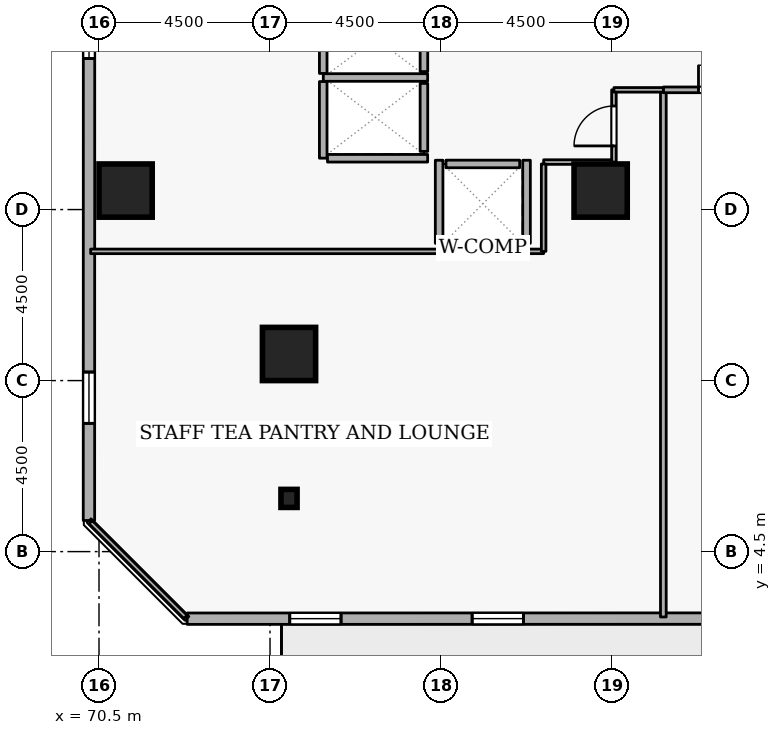
"""IFC4 building model, lengths in metres.
Left out: names, types, materials, properties, quantities, classifications, styles, units other than length and angle.
Written with IfcOpenShell. Run it as: python <this file> out.ifc"""

import sys

from ifc_helpers import new_model, si_unit, direction, frame, frame_2d, origin, origin_2d, place, context, subcontext, project, spatial, rectangle, i_section, extrude, element, fill, save


model = new_model("IFC4")
c1 = context("Model", 3, precision=1e-05, world=origin(), true_north=direction((0.0, 1.0)))
c2 = subcontext(c1, "Body", "Model", "MODEL_VIEW")
j1 = project(units=[si_unit("LENGTHUNIT", "METRE"), si_unit("PLANEANGLEUNIT", "RADIAN")], contexts=[c1])
p1 = place(None, origin())
s1 = spatial("IfcSite", under=j1, at=p1, CompositionType="ELEMENT")
p2 = place(p1, origin())
s2 = spatial("IfcBuilding", under=s1, at=p2, CompositionType="ELEMENT")
p3 = place(p2, frame((0.0, 0.0, 45.9)))
s3 = spatial("IfcBuildingStorey", under=s2, at=p3, CompositionType="ELEMENT", Elevation=45.9)
for number, where, z_axis, x_axis in (
    (1, (71.2, 14.0, 0.0), (0.0, 0.0, 1.0), (1.0, 0.0, 0.0)),
    (2, (75.5, 9.7, 0.0), (0.0, 0.0, 1.0), (1.0, 0.0, 0.0)),
    (3, (83.7, 14.0, 0.0), (0.0, 0.0, 1.0), (1.0, 0.0, 0.0)),
):
    element("IfcColumn", number, at=place(p3, frame(where, z_axis=z_axis, x_axis=x_axis)), inside=s3, PredefinedType="COLUMN", context=c2, shape_type="SweptSolid", body=[
        extrude(rectangle(XDim=1.4, YDim=1.4, at=origin_2d()), origin(), (0.0, 0.0, 1.0), 3.6),
    ])
p4 = place(p3, frame((75.5, 5.9, 0.0), z_axis=(0.0, 0.0, 1.0), x_axis=(1.0, 0.0, 0.0)))
e4 = element("IfcColumn", 4, at=p4, inside=s3, PredefinedType="COLUMN", context=c2, shape_type="SweptSolid", body=[
    extrude(i_section(OverallWidth=0.424, OverallDepth=0.475, WebThickness=0.048, FlangeThickness=0.077, FilletRadius=0.015, at=origin_2d()), origin(), (0.0, 0.0, 1.0), 3.6),
])
p5 = place(p3, frame((72.819, 2.735, 0.0), z_axis=(0.0, 0.0, 1.0), x_axis=(0.999999983929, 0.00017928314, 0.0)))
e5 = element("IfcWall", 5, at=p5, inside=s3, PredefinedType="STANDARD", context=c2, shape_type="SweptSolid", body=[
    extrude(rectangle(XDim=35.406, YDim=0.3, at=frame_2d((17.703, 0.0))), origin(), (0.0, 0.0, 1.0), 2.22),
])
p6 = place(p5, frame((19.503, 0.0, 0.0)))
e6 = element("IfcOpeningElement", 6, at=p6, cuts=e5, PredefinedType="OPENING", context=c2, shape_type="SweptSolid", body=[
    extrude(rectangle(XDim=1.0, YDim=2.08, at=frame_2d((0.5, 1.04))), frame((0.0, 0.16, 0.0), z_axis=(0.0, -1.0, 0.0), x_axis=(1.0, 0.0, 0.0)), (0.0, 0.0, 1.0), 0.32),
])
p7 = place(p5, frame((2.7, 0.0, 0.72)))
e7 = element("IfcOpeningElement", 7, at=p7, cuts=e5, PredefinedType="OPENING", context=c2, shape_type="SweptSolid", body=[
    extrude(rectangle(XDim=1.35, YDim=1.05, at=frame_2d((0.675, 0.525))), frame((0.0, 0.16, 0.0), z_axis=(0.0, -1.0, 0.0), x_axis=(1.0, 0.0, 0.0)), (0.0, 0.0, 1.0), 0.32),
])
p8 = place(p5, frame((7.5, 0.0, 0.72)))
e8 = element("IfcOpeningElement", 8, at=p8, cuts=e5, PredefinedType="OPENING", context=c2, shape_type="SweptSolid", body=[
    extrude(rectangle(XDim=1.35, YDim=1.05, at=frame_2d((0.675, 0.525))), frame((0.0, 0.16, 0.0), z_axis=(0.0, -1.0, 0.0), x_axis=(1.0, 0.0, 0.0)), (0.0, 0.0, 1.0), 0.32),
])
p9 = place(p5, frame((17.1, 0.0, 0.72)))
e9 = element("IfcOpeningElement", 9, at=p9, cuts=e5, PredefinedType="OPENING", context=c2, shape_type="SweptSolid", body=[
    extrude(rectangle(XDim=1.35, YDim=1.05, at=frame_2d((0.675, 0.525))), frame((0.0, 0.16, 0.0), z_axis=(0.0, -1.0, 0.0), x_axis=(1.0, 0.0, 0.0)), (0.0, 0.0, 1.0), 0.32),
])
p10 = place(p5, frame((21.9, 0.0, 0.72)))
e10 = element("IfcOpeningElement", 10, at=p10, cuts=e5, PredefinedType="OPENING", context=c2, shape_type="SweptSolid", body=[
    extrude(rectangle(XDim=1.35, YDim=1.05, at=frame_2d((0.675, 0.525))), frame((0.0, 0.16, 0.0), z_axis=(0.0, -1.0, 0.0), x_axis=(1.0, 0.0, 0.0)), (0.0, 0.0, 1.0), 0.32),
])
p11 = place(p5, frame((26.7, 0.0, 0.72)))
e11 = element("IfcOpeningElement", 11, at=p11, cuts=e5, PredefinedType="OPENING", context=c2, shape_type="SweptSolid", body=[
    extrude(rectangle(XDim=1.35, YDim=1.05, at=frame_2d((0.675, 0.525))), frame((0.0, 0.16, 0.0), z_axis=(0.0, -1.0, 0.0), x_axis=(1.0, 0.0, 0.0)), (0.0, 0.0, 1.0), 0.32),
])
p12 = place(p3, frame((70.241, 40.725, 0.0), z_axis=(0.0, 0.0, 1.0), x_axis=(-0.00017928314, -0.999999983929, 0.0)))
e12 = element("IfcWall", 12, at=p12, inside=s3, PredefinedType="STANDARD", context=c2, shape_type="SweptSolid", body=[
    extrude(rectangle(XDim=35.406, YDim=0.3, at=frame_2d((17.703, 0.0))), origin(), (0.0, 0.0, 1.0), 2.22),
])
p13 = place(p12, frame((7.5, 0.0, 0.72)))
e13 = element("IfcOpeningElement", 13, at=p13, cuts=e12, PredefinedType="OPENING", context=c2, shape_type="SweptSolid", body=[
    extrude(rectangle(XDim=1.35, YDim=1.05, at=frame_2d((0.675, 0.525))), frame((0.0, 0.16, 0.0), z_axis=(0.0, -1.0, 0.0), x_axis=(1.0, 0.0, 0.0)), (0.0, 0.0, 1.0), 0.32),
])
p14 = place(p12, frame((17.1, 0.0, 0.72)))
e14 = element("IfcOpeningElement", 14, at=p14, cuts=e12, PredefinedType="OPENING", context=c2, shape_type="SweptSolid", body=[
    extrude(rectangle(XDim=1.35, YDim=1.05, at=frame_2d((0.675, 0.525))), frame((0.0, 0.16, 0.0), z_axis=(0.0, -1.0, 0.0), x_axis=(1.0, 0.0, 0.0)), (0.0, 0.0, 1.0), 0.32),
])
p15 = place(p12, frame((21.9, 0.0, 0.72)))
e15 = element("IfcOpeningElement", 15, at=p15, cuts=e12, PredefinedType="OPENING", context=c2, shape_type="SweptSolid", body=[
    extrude(rectangle(XDim=1.35, YDim=1.05, at=frame_2d((0.675, 0.525))), frame((0.0, 0.16, 0.0), z_axis=(0.0, -1.0, 0.0), x_axis=(1.0, 0.0, 0.0)), (0.0, 0.0, 1.0), 0.32),
])
p16 = place(p12, frame((31.5, 0.0, 0.72)))
e16 = element("IfcOpeningElement", 16, at=p16, cuts=e12, PredefinedType="OPENING", context=c2, shape_type="SweptSolid", body=[
    extrude(rectangle(XDim=1.35, YDim=1.05, at=frame_2d((0.675, 0.525))), frame((0.0, 0.16, 0.0), z_axis=(0.0, -1.0, 0.0), x_axis=(1.0, 0.0, 0.0)), (0.0, 0.0, 1.0), 0.32),
])
p17 = place(p3, frame((79.05, 17.13, 0.0), z_axis=(0.0, 0.0, 1.0), x_axis=(0.0, 1.0, 0.0)))
e17 = element("IfcWall", 17, at=p17, inside=s3, PredefinedType="STANDARD", context=c2, shape_type="SweptSolid", body=[
    extrude(rectangle(XDim=1.74, YDim=0.2, at=frame_2d((0.87, 0.0))), origin(), (0.0, 0.0, 1.0), 3.26),
])
p18 = place(p3, frame((79.05, 15.03, 0.0), z_axis=(0.0, 0.0, 1.0), x_axis=(0.0, 1.0, 0.0)))
e18 = element("IfcWall", 18, at=p18, inside=s3, PredefinedType="STANDARD", context=c2, shape_type="SweptSolid", body=[
    extrude(rectangle(XDim=1.79, YDim=0.2, at=frame_2d((0.895, 0.0))), origin(), (0.0, 0.0, 1.0), 3.26),
])
p19 = place(p3, frame((79.63, 14.7, 0.0), z_axis=(0.0, 0.0, 1.0), x_axis=(1.0, 0.0, 0.0)))
e19 = element("IfcWall", 19, at=p19, inside=s3, PredefinedType="STANDARD", context=c2, shape_type="SweptSolid", body=[
    extrude(rectangle(XDim=1.94, YDim=0.2, at=frame_2d((0.97, 0.0))), origin(), (0.0, 0.0, 1.0), 3.26),
])
p20 = place(p3, frame((76.402, 16.975, 0.0), z_axis=(0.0, 0.0, 1.0), x_axis=(1.0, 0.0, 0.0)))
e20 = element("IfcWall", 20, at=p20, inside=s3, PredefinedType="STANDARD", context=c2, shape_type="SweptSolid", body=[
    extrude(rectangle(XDim=2.746, YDim=0.2, at=frame_2d((1.373, 0.0))), origin(), (0.0, 0.0, 1.0), 3.26),
])
p21 = place(p3, frame((76.4, 14.852, 0.0), z_axis=(0.0, 0.0, 1.0), x_axis=(0.0, 1.0, 0.0)))
e21 = element("IfcWall", 21, at=p21, inside=s3, PredefinedType="STANDARD", context=c2, shape_type="SweptSolid", body=[
    extrude(rectangle(XDim=2.016, YDim=0.2, at=frame_2d((1.008, 0.0))), origin(), (0.0, 0.0, 1.0), 3.26),
])
p22 = place(p3, frame((76.4, 17.082, 0.0), z_axis=(0.0, 0.0, 1.0), x_axis=(0.0, 1.0, 0.0)))
e22 = element("IfcWall", 22, at=p22, inside=s3, PredefinedType="STANDARD", context=c2, shape_type="SweptSolid", body=[
    extrude(rectangle(XDim=1.856, YDim=0.2, at=frame_2d((0.928, 0.0))), origin(), (0.0, 0.0, 1.0), 3.26),
])
p23 = place(p3, frame((76.512, 14.85, 0.0), z_axis=(0.0, 0.0, 1.0), x_axis=(1.0, 0.0, 0.0)))
e23 = element("IfcWall", 23, at=p23, inside=s3, PredefinedType="STANDARD", context=c2, shape_type="SweptSolid", body=[
    extrude(rectangle(XDim=2.636, YDim=0.2, at=frame_2d((1.318, 0.0))), origin(), (0.0, 0.0, 1.0), 3.26),
])
p24 = place(p3, frame((79.452, 12.5, 0.0), z_axis=(0.0, 0.0, 1.0), x_axis=(1.0, 0.0, 0.0)))
e24 = element("IfcWall", 24, at=p24, inside=s3, PredefinedType="STANDARD", context=c2, shape_type="SweptSolid", body=[
    extrude(rectangle(XDim=2.296, YDim=0.2, at=frame_2d((1.148, 0.0))), origin(), (0.0, 0.0, 1.0), 3.26),
])
for number, where, z_axis, x_axis in (
    (25, (81.75, 12.612, 0.0), (0.0, 0.0, 1.0), (0.0, 1.0, 0.0)),
    (26, (79.45, 12.612, 0.0), (0.0, 0.0, 1.0), (0.0, 1.0, 0.0)),
):
    element("IfcWall", number, at=place(p3, frame(where, z_axis=z_axis, x_axis=x_axis)), inside=s3, PredefinedType="STANDARD", context=c2, shape_type="SweptSolid", body=[
        extrude(rectangle(XDim=2.186, YDim=0.2, at=frame_2d((1.093, 0.0))), origin(), (0.0, 0.0, 1.0), 3.26),
    ])
p25 = place(p3, frame((85.35, 2.78, 0.0), z_axis=(0.0, 0.0, 1.0), x_axis=(0.0, 1.0, 0.0)))
e27 = element("IfcWall", 27, at=p25, inside=s3, PredefinedType="PARTITIONING", context=c2, shape_type="SweptSolid", body=[
    extrude(rectangle(XDim=13.87, YDim=0.15, at=frame_2d((6.935, 0.0))), origin(), (0.0, 0.0, 1.0), 3.26),
])
p26 = place(p3, frame((85.35, 16.65, 0.0), z_axis=(0.0, 0.0, 1.0), x_axis=(1.0, 0.0, 0.0)))
e28 = element("IfcWall", 28, at=p26, inside=s3, PredefinedType="PARTITIONING", context=c2, shape_type="SweptSolid", body=[
    extrude(rectangle(XDim=3.15, YDim=0.15, at=frame_2d((1.575, 0.0))), origin(), (0.0, 0.0, 1.0), 3.26),
])
p27 = place(p26, frame((0.925, 0.0, 0.0)))
e29 = element("IfcOpeningElement", 29, at=p27, cuts=e28, PredefinedType="OPENING", context=c2, shape_type="SweptSolid", body=[
    extrude(rectangle(XDim=1.3, YDim=2.12, at=frame_2d((0.65, 1.06))), frame((0.0, 0.085, 0.0), z_axis=(0.0, -1.0, 0.0), x_axis=(1.0, 0.0, 0.0)), (0.0, 0.0, 1.0), 0.17),
])
p28 = place(p3, frame((82.2, 14.75, 0.0), z_axis=(0.0, 0.0, 1.0), x_axis=(1.0, 0.0, 0.0)))
e30 = element("IfcWall", 30, at=p28, inside=s3, PredefinedType="PARTITIONING", context=c2, shape_type="SweptSolid", body=[
    extrude(rectangle(XDim=1.85, YDim=0.12, at=frame_2d((0.925, 0.0))), origin(), (0.0, 0.0, 1.0), 3.26),
])
p29 = place(p3, frame((84.05, 14.75, 0.0), z_axis=(0.0, 0.0, 1.0), x_axis=(0.0, 1.0, 0.0)))
e31 = element("IfcWall", 31, at=p29, inside=s3, PredefinedType="PARTITIONING", context=c2, shape_type="SweptSolid", body=[
    extrude(rectangle(XDim=1.9, YDim=0.12, at=frame_2d((0.95, 0.0))), origin(), (0.0, 0.0, 1.0), 3.26),
])
p30 = place(p29, frame((0.425, 0.0, 0.0)))
e32 = element("IfcOpeningElement", 32, at=p30, cuts=e31, PredefinedType="OPENING", context=c2, shape_type="SweptSolid", body=[
    extrude(rectangle(XDim=1.05, YDim=2.1, at=frame_2d((0.525, 1.05))), frame((0.0, 0.07, 0.0), z_axis=(0.0, -1.0, 0.0), x_axis=(1.0, 0.0, 0.0)), (0.0, 0.0, 1.0), 0.14),
])
p31 = place(p3, frame((84.05, 16.65, 0.0), z_axis=(0.0, 0.0, 1.0), x_axis=(1.0, 0.0, 0.0)))
e33 = element("IfcWall", 33, at=p31, inside=s3, PredefinedType="PARTITIONING", context=c2, shape_type="SweptSolid", body=[
    extrude(rectangle(XDim=1.3, YDim=0.12, at=frame_2d((0.65, 0.0))), origin(), (0.0, 0.0, 1.0), 3.26),
])
p32 = place(p3, frame((72.775, 2.78, 0.0), z_axis=(0.0, 0.0, 1.0), x_axis=(-0.707106781187, 0.707106781187, 0.0)))
e34 = element("IfcWall", 34, at=p32, inside=s3, PredefinedType="PARTITIONING", context=c2, shape_type="SweptSolid", body=[
    extrude(rectangle(XDim=3.528, YDim=0.12, at=frame_2d((1.764, 0.0))), origin(), (0.0, 0.0, 1.0), 3.26),
])
p33 = place(p3, frame((70.28, 12.4, 0.0), z_axis=(0.0, 0.0, 1.0), x_axis=(1.0, 0.0, 0.0)))
e35 = element("IfcWall", 35, at=p33, inside=s3, PredefinedType="PARTITIONING", context=c2, shape_type="SweptSolid", body=[
    extrude(rectangle(XDim=9.172, YDim=0.12, at=frame_2d((4.586, 0.0))), origin(), (0.0, 0.0, 1.0), 3.26),
])
p34 = place(p3, frame((81.748, 12.4, 0.0), z_axis=(0.0, 0.0, 1.0), x_axis=(1.0, 0.0, 0.0)))
e36 = element("IfcWall", 36, at=p34, inside=s3, PredefinedType="PARTITIONING", context=c2, shape_type="SweptSolid", body=[
    extrude(rectangle(XDim=0.452, YDim=0.12, at=frame_2d((0.226, 0.0))), origin(), (0.0, 0.0, 1.0), 3.26),
])
p35 = place(p3, frame((82.2, 12.4, 0.0), z_axis=(0.0, 0.0, 1.0), x_axis=(0.0, 1.0, 0.0)))
e37 = element("IfcWall", 37, at=p35, inside=s3, PredefinedType="PARTITIONING", context=c2, shape_type="SweptSolid", body=[
    extrude(rectangle(XDim=2.3, YDim=0.12, at=frame_2d((1.15, 0.0))), origin(), (0.0, 0.0, 1.0), 3.26),
])
p36 = place(p7, origin())
e38 = element("IfcWindow", 38, at=p36, inside=s3, PartitioningType="SINGLE_PANEL", PredefinedType="WINDOW", context=c2, shape_type="SweptSolid", body=[
    extrude(rectangle(XDim=1.35, YDim=1.05, at=frame_2d((0.675, 0.525))), frame((0.0, 0.03, 0.0), z_axis=(0.0, -1.0, 0.0), x_axis=(1.0, 0.0, 0.0)), (0.0, 0.0, 1.0), 0.06),
])
fill(e7, e38)
p37 = place(p8, origin())
e39 = element("IfcWindow", 39, at=p37, inside=s3, PartitioningType="SINGLE_PANEL", PredefinedType="WINDOW", context=c2, shape_type="SweptSolid", body=[
    extrude(rectangle(XDim=1.35, YDim=1.05, at=frame_2d((0.675, 0.525))), frame((0.0, 0.03, 0.0), z_axis=(0.0, -1.0, 0.0), x_axis=(1.0, 0.0, 0.0)), (0.0, 0.0, 1.0), 0.06),
])
fill(e8, e39)
p38 = place(p15, origin())
e40 = element("IfcWindow", 40, at=p38, inside=s3, PartitioningType="SINGLE_PANEL", PredefinedType="WINDOW", context=c2, shape_type="SweptSolid", body=[
    extrude(rectangle(XDim=1.35, YDim=1.05, at=frame_2d((0.675, 0.525))), frame((0.0, 0.03, 0.0), z_axis=(0.0, -1.0, 0.0), x_axis=(1.0, 0.0, 0.0)), (0.0, 0.0, 1.0), 0.06),
])
fill(e15, e40)
p39 = place(p16, origin())
e41 = element("IfcWindow", 41, at=p39, inside=s3, PartitioningType="SINGLE_PANEL", PredefinedType="WINDOW", context=c2, shape_type="SweptSolid", body=[
    extrude(rectangle(XDim=1.35, YDim=1.05, at=frame_2d((0.675, 0.525))), frame((0.0, 0.03, 0.0), z_axis=(0.0, -1.0, 0.0), x_axis=(1.0, 0.0, 0.0)), (0.0, 0.0, 1.0), 0.06),
])
fill(e16, e41)
p40 = place(p27, origin())
e42 = element("IfcDoor", 42, at=p40, inside=s3, OperationType="DOUBLE_DOOR_SINGLE_SWING", PredefinedType="DOOR", context=c2, shape_type="SweptSolid", body=[
    extrude(rectangle(XDim=1.3, YDim=2.12, at=frame_2d((0.65, 1.06))), frame((0.0, 0.025, 0.0), z_axis=(0.0, -1.0, 0.0), x_axis=(1.0, 0.0, 0.0)), (0.0, 0.0, 1.0), 0.05),
])
fill(e29, e42)
p41 = place(p30, origin())
e43 = element("IfcDoor", 43, at=p41, inside=s3, OperationType="SINGLE_SWING_LEFT", PredefinedType="DOOR", context=c2, shape_type="SweptSolid", body=[
    extrude(rectangle(XDim=1.05, YDim=2.1, at=frame_2d((0.525, 1.05))), frame((0.0, 0.025, 0.0), z_axis=(0.0, -1.0, 0.0), x_axis=(1.0, 0.0, 0.0)), (0.0, 0.0, 1.0), 0.05),
])
fill(e32, e43)
save(model, sys.argv[1])
